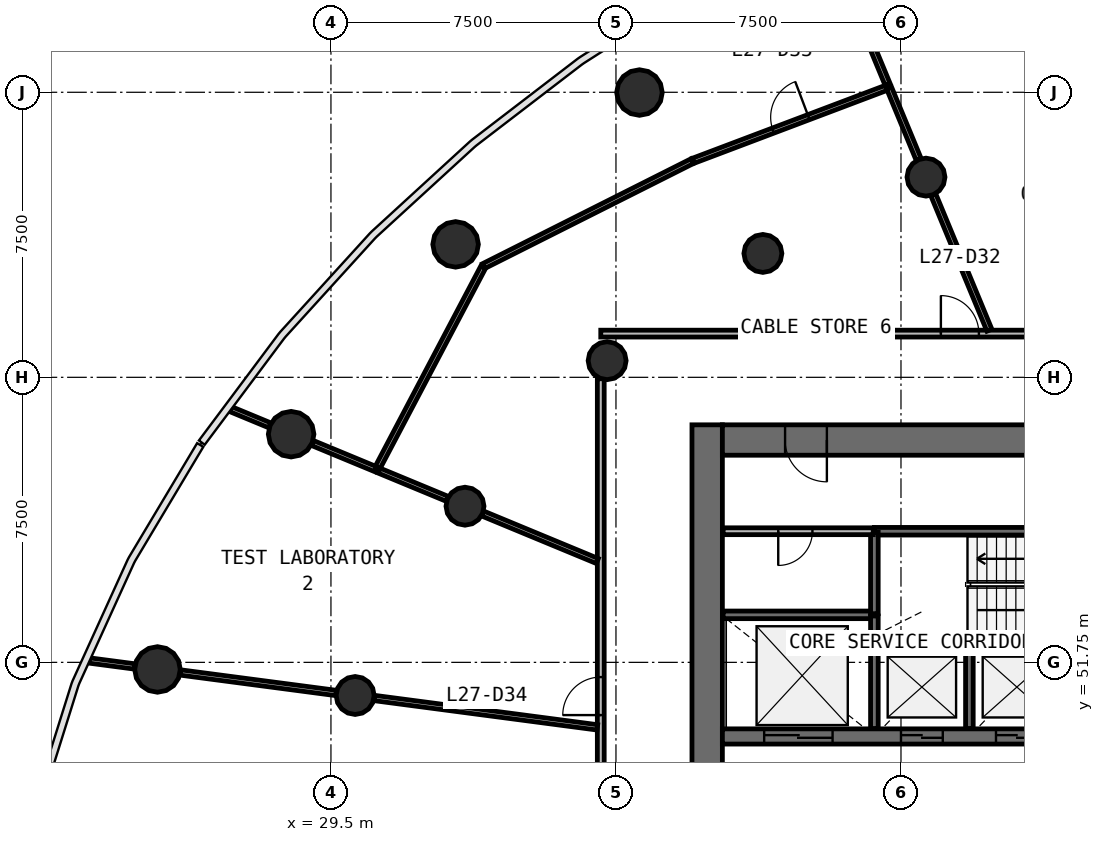
"""IFC4 building model, lengths in metres.
Left out: names, types, materials, properties, quantities, classifications, styles, units other than length and angle.
Written with IfcOpenShell. Run it as: python <this file> out.ifc"""

import sys

from ifc_helpers import new_model, si_unit, direction, frame, frame_2d, origin, origin_2d, place, context, subcontext, project, spatial, rectangle, circle, extrude, source, transform, mapped, element, fill, save


model = new_model("IFC4")
c1 = context("Model", 3, precision=1e-05, world=origin(), true_north=direction((0.0, 1.0)))
c2 = subcontext(c1, "Body", "Model", "MODEL_VIEW")
j1 = project(units=[si_unit("LENGTHUNIT", "METRE"), si_unit("PLANEANGLEUNIT", "RADIAN")], contexts=[c1])
p1 = place(None, origin())
s1 = spatial("IfcSite", under=j1, at=p1, CompositionType="ELEMENT")
p2 = place(p1, origin())
s2 = spatial("IfcBuilding", under=s1, at=p2, CompositionType="ELEMENT")
p3 = place(p2, frame((0.0, 0.0, 116.7)))
s3 = spatial("IfcBuildingStorey", under=s2, at=p3, CompositionType="ELEMENT", Elevation=116.7)
p4 = place(p3, frame((39.4, 58.0, 0.0), z_axis=(0.0, 0.0, 1.0), x_axis=(0.0, -1.0, 0.0)))
e1 = element("IfcWall", 1, at=p4, inside=s3, PredefinedType="SHEAR", context=c2, shape_type="SweptSolid", body=[
    extrude(rectangle(XDim=20.0, YDim=0.8, at=frame_2d((10.0, 0.0))), origin(), (0.0, 0.0, 1.0), 4.1),
])
p5 = place(p4, frame((9.1, 0.0, 0.0)))
e2 = element("IfcOpeningElement", 2, at=p5, cuts=e1, PredefinedType="OPENING", context=c2, shape_type="SweptSolid", body=[
    extrude(rectangle(XDim=1.8, YDim=2.1, at=frame_2d((0.9, 1.05))), frame((0.0, 0.41, 0.0), z_axis=(0.0, -1.0, 0.0), x_axis=(1.0, 0.0, 0.0)), (0.0, 0.0, 1.0), 0.82),
])
p6 = place(p3, frame((64.2, 57.6, 0.0), z_axis=(0.0, 0.0, 1.0), x_axis=(-1.0, 0.0, 0.0)))
e3 = element("IfcWall", 3, at=p6, inside=s3, PredefinedType="SHEAR", context=c2, shape_type="SweptSolid", body=[
    extrude(rectangle(XDim=24.4, YDim=0.8, at=frame_2d((12.2, 0.0))), origin(), (0.0, 0.0, 1.0), 4.1),
])
p7 = place(p6, frame((21.65, 0.0, 0.0)))
e4 = element("IfcOpeningElement", 4, at=p7, cuts=e3, PredefinedType="OPENING", context=c2, shape_type="SweptSolid", body=[
    extrude(rectangle(XDim=1.1, YDim=2.1, at=frame_2d((0.55, 1.05))), frame((0.0, 0.41, 0.0), z_axis=(0.0, -1.0, 0.0), x_axis=(1.0, 0.0, 0.0)), (0.0, 0.0, 1.0), 0.82),
])
p8 = place(p6, frame((2.15, 0.0, 0.0)))
e5 = element("IfcOpeningElement", 5, at=p8, cuts=e3, PredefinedType="OPENING", context=c2, shape_type="SweptSolid", body=[
    extrude(rectangle(XDim=1.1, YDim=2.1, at=frame_2d((0.55, 1.05))), frame((0.0, 0.41, 0.0), z_axis=(0.0, -1.0, 0.0), x_axis=(1.0, 0.0, 0.0)), (0.0, 0.0, 1.0), 0.82),
])
p9 = place(p3, frame((39.8, 49.8, 0.0), z_axis=(0.0, 0.0, 1.0), x_axis=(1.0, 0.0, 0.0)))
e6 = element("IfcWall", 6, at=p9, inside=s3, PredefinedType="SHEAR", context=c2, shape_type="SweptSolid", body=[
    extrude(rectangle(XDim=24.4, YDim=0.4, at=frame_2d((12.2, 0.0))), origin(), (0.0, 0.0, 1.0), 4.1),
])
p10 = place(p9, frame((4.7, 0.0, 0.0)))
e7 = element("IfcOpeningElement", 7, at=p10, cuts=e6, PredefinedType="OPENING", context=c2, shape_type="SweptSolid", body=[
    extrude(rectangle(XDim=1.1, YDim=2.1, at=frame_2d((0.55, 1.05))), frame((0.0, 0.21, 0.0), z_axis=(0.0, -1.0, 0.0), x_axis=(1.0, 0.0, 0.0)), (0.0, 0.0, 1.0), 0.42),
])
p11 = place(p9, frame((7.2, 0.0, 0.0)))
e8 = element("IfcOpeningElement", 8, at=p11, cuts=e6, PredefinedType="OPENING", context=c2, shape_type="SweptSolid", body=[
    extrude(rectangle(XDim=1.1, YDim=2.1, at=frame_2d((0.55, 1.05))), frame((0.0, 0.21, 0.0), z_axis=(0.0, -1.0, 0.0), x_axis=(1.0, 0.0, 0.0)), (0.0, 0.0, 1.0), 0.42),
])
p12 = place(p9, frame((9.7, 0.0, 0.0)))
e9 = element("IfcOpeningElement", 9, at=p12, cuts=e6, PredefinedType="OPENING", context=c2, shape_type="SweptSolid", body=[
    extrude(rectangle(XDim=1.1, YDim=2.1, at=frame_2d((0.55, 1.05))), frame((0.0, 0.21, 0.0), z_axis=(0.0, -1.0, 0.0), x_axis=(1.0, 0.0, 0.0)), (0.0, 0.0, 1.0), 0.42),
])
p13 = place(p9, frame((1.1, 0.0, 0.0)))
e10 = element("IfcOpeningElement", 10, at=p13, cuts=e6, PredefinedType="OPENING", context=c2, shape_type="SweptSolid", body=[
    extrude(rectangle(XDim=1.8, YDim=2.4, at=frame_2d((0.9, 1.2))), frame((0.0, 0.21, 0.0), z_axis=(0.0, -1.0, 0.0), x_axis=(1.0, 0.0, 0.0)), (0.0, 0.0, 1.0), 0.42),
])
p14 = place(p9, frame((20.65, 0.0, 0.0)))
e11 = element("IfcOpeningElement", 11, at=p14, cuts=e6, PredefinedType="OPENING", context=c2, shape_type="SweptSolid", body=[
    extrude(rectangle(XDim=0.9, YDim=2.1, at=frame_2d((0.45, 1.05))), frame((0.0, 0.21, 0.0), z_axis=(0.0, -1.0, 0.0), x_axis=(1.0, 0.0, 0.0)), (0.0, 0.0, 1.0), 0.42),
])
p15 = place(p9, frame((22.65, 0.0, 0.0)))
e12 = element("IfcOpeningElement", 12, at=p15, cuts=e6, PredefinedType="OPENING", context=c2, shape_type="SweptSolid", body=[
    extrude(rectangle(XDim=0.9, YDim=2.1, at=frame_2d((0.45, 1.05))), frame((0.0, 0.21, 0.0), z_axis=(0.0, -1.0, 0.0), x_axis=(1.0, 0.0, 0.0)), (0.0, 0.0, 1.0), 0.42),
])
p16 = place(p9, frame((11.85, 0.0, 0.0)))
e13 = element("IfcOpeningElement", 13, at=p16, cuts=e6, PredefinedType="OPENING", context=c2, shape_type="SweptSolid", body=[
    extrude(rectangle(XDim=0.9, YDim=2.1, at=frame_2d((0.45, 1.05))), frame((0.0, 0.21, 0.0), z_axis=(0.0, -1.0, 0.0), x_axis=(1.0, 0.0, 0.0)), (0.0, 0.0, 1.0), 0.42),
])
m1 = source(origin(), c2, "Body", "SweptSolid", [
    extrude(circle(Radius=0.6, at=origin_2d()), origin(), (0.0, 0.0, 1.0), 4.1),
])
for number, where, z_axis, x_axis in (
    (14, (37.618, 66.743, 0.0), (0.0, 0.0, 1.0), (1.0, 0.0, 0.0)),
    (15, (32.78, 62.748, 0.0), (0.0, 0.0, 1.0), (1.0, 0.0, 0.0)),
    (16, (28.452, 57.754, 0.0), (0.0, 0.0, 1.0), (1.0, 0.0, 0.0)),
    (17, (24.936, 51.563, 0.0), (0.0, 0.0, 1.0), (1.0, 0.0, 0.0)),
):
    element("IfcColumn", number, at=place(p3, frame(where, z_axis=z_axis, x_axis=x_axis)), inside=s3, PredefinedType="COLUMN", context=c2, shape_type="MappedRepresentation", body=[
        mapped(m1, transform((0.0, 0.0, 0.0), scale=1.0)),
    ])
m2 = source(origin(), c2, "Body", "SweptSolid", [
    extrude(circle(Radius=0.5, at=origin_2d()), origin(), (0.0, 0.0, 1.0), 4.1),
])
for number, where, z_axis, x_axis in (
    (18, (45.158, 64.518, 0.0), (0.0, 0.0, 1.0), (1.0, 0.0, 0.0)),
    (19, (40.866, 62.51, 0.0), (0.0, 0.0, 1.0), (1.0, 0.0, 0.0)),
    (20, (36.768, 59.688, 0.0), (0.0, 0.0, 1.0), (1.0, 0.0, 0.0)),
    (21, (33.028, 55.859, 0.0), (0.0, 0.0, 1.0), (1.0, 0.0, 0.0)),
    (22, (30.137, 50.878, 0.0), (0.0, 0.0, 1.0), (1.0, 0.0, 0.0)),
):
    element("IfcColumn", number, at=place(p3, frame(where, z_axis=z_axis, x_axis=x_axis)), inside=s3, PredefinedType="COLUMN", context=c2, shape_type="MappedRepresentation", body=[
        mapped(m2, transform((0.0, 0.0, 0.0), scale=1.0)),
    ])
p17 = place(p3, frame((50.4, 55.2, 0.0), z_axis=(0.0, 0.0, 1.0), x_axis=(-1.0, 0.0, 0.0)))
e23 = element("IfcWall", 23, at=p17, inside=s3, PredefinedType="SOLIDWALL", context=c2, shape_type="SweptSolid", body=[
    extrude(rectangle(XDim=6.6, YDim=0.2, at=frame_2d((3.3, 0.0))), origin(), (0.0, 0.0, 1.0), 3.7),
])
p18 = place(p17, frame((0.3, 0.0, 0.0)))
e24 = element("IfcOpeningElement", 24, at=p18, cuts=e23, PredefinedType="OPENING", context=c2, shape_type="SweptSolid", body=[
    extrude(rectangle(XDim=1.2, YDim=2.1, at=frame_2d((0.6, 1.05))), frame((0.0, 0.11, 0.0), z_axis=(0.0, -1.0, 0.0), x_axis=(1.0, 0.0, 0.0)), (0.0, 0.0, 1.0), 0.22),
])
p19 = place(p3, frame((43.8, 53.0, 0.0), z_axis=(0.0, 0.0, 1.0), x_axis=(-1.0, 0.0, 0.0)))
e25 = element("IfcWall", 25, at=p19, inside=s3, PredefinedType="SOLIDWALL", context=c2, shape_type="SweptSolid", body=[
    extrude(rectangle(XDim=3.98, YDim=0.2, at=frame_2d((1.99, 0.0))), origin(), (0.0, 0.0, 1.0), 3.7),
])
p20 = place(p3, frame((46.3, 52.4, 0.0), z_axis=(0.0, 0.0, 1.0), x_axis=(-1.0, 0.0, 0.0)))
e26 = element("IfcWall", 26, at=p20, inside=s3, PredefinedType="SOLIDWALL", context=c2, shape_type="SweptSolid", body=[
    extrude(rectangle(XDim=2.5, YDim=0.2, at=frame_2d((1.25, 0.0))), origin(), (0.0, 0.0, 1.0), 3.7),
])
p21 = place(p3, frame((48.8, 52.4, 0.0), z_axis=(0.0, 0.0, 1.0), x_axis=(-1.0, 0.0, 0.0)))
e27 = element("IfcWall", 27, at=p21, inside=s3, PredefinedType="SOLIDWALL", context=c2, shape_type="SweptSolid", body=[
    extrude(rectangle(XDim=2.47, YDim=0.2, at=frame_2d((1.235, 0.0))), origin(), (0.0, 0.0, 1.0), 3.7),
])
for number, where, z_axis, x_axis in (
    (28, (43.8, 52.37, 0.0), (0.0, 0.0, 1.0), (0.0, -1.0, 0.0)),
    (29, (46.3, 50.01, 0.0), (0.0, 0.0, 1.0), (0.0, 1.0, 0.0)),
):
    element("IfcWall", number, at=place(p3, frame(where, z_axis=z_axis, x_axis=x_axis)), inside=s3, PredefinedType="SOLIDWALL", context=c2, shape_type="SweptSolid", body=[
        extrude(rectangle(XDim=2.36, YDim=0.2, at=frame_2d((1.18, 0.0))), origin(), (0.0, 0.0, 1.0), 3.7),
    ])
p22 = place(p3, frame((43.8, 55.17, 0.0), z_axis=(0.0, 0.0, 1.0), x_axis=(0.0, -1.0, 0.0)))
e30 = element("IfcWall", 30, at=p22, inside=s3, PredefinedType="SOLIDWALL", context=c2, shape_type="SweptSolid", body=[
    extrude(rectangle(XDim=2.14, YDim=0.2, at=frame_2d((1.07, 0.0))), origin(), (0.0, 0.0, 1.0), 3.7),
])
p23 = place(p3, frame((43.8, 52.43, 0.0), z_axis=(0.0, 0.0, 1.0), x_axis=(0.0, 1.0, 0.0)))
e31 = element("IfcWall", 31, at=p23, inside=s3, PredefinedType="SOLIDWALL", context=c2, shape_type="SweptSolid", body=[
    extrude(rectangle(XDim=0.54, YDim=0.2, at=frame_2d((0.27, 0.0))), origin(), (0.0, 0.0, 1.0), 3.7),
])
p24 = place(p3, frame((36.6, 60.4, 0.0), z_axis=(0.0, 0.0, 1.0), x_axis=(1.0, 0.0, 0.0)))
e32 = element("IfcWall", 32, at=p24, inside=s3, PredefinedType="PARTITIONING", context=c2, shape_type="SweptSolid", body=[
    extrude(rectangle(XDim=30.8, YDim=0.18, at=frame_2d((15.4, 0.0))), origin(), (0.0, 0.0, 1.0), 2.9),
])
p25 = place(p24, frame((17.35, 0.0, 0.0)))
e33 = element("IfcOpeningElement", 33, at=p25, cuts=e32, PredefinedType="OPENING", context=c2, shape_type="SweptSolid", body=[
    extrude(rectangle(XDim=1.0, YDim=2.1, at=frame_2d((0.5, 1.05))), frame((0.0, 0.1, 0.0), z_axis=(0.0, -1.0, 0.0), x_axis=(1.0, 0.0, 0.0)), (0.0, 0.0, 1.0), 0.2),
])
p26 = place(p24, frame((14.95, 0.0, 0.0)))
e34 = element("IfcOpeningElement", 34, at=p26, cuts=e32, PredefinedType="OPENING", context=c2, shape_type="SweptSolid", body=[
    extrude(rectangle(XDim=1.0, YDim=2.1, at=frame_2d((0.5, 1.05))), frame((0.0, 0.1, 0.0), z_axis=(0.0, -1.0, 0.0), x_axis=(1.0, 0.0, 0.0)), (0.0, 0.0, 1.0), 0.2),
])
p27 = place(p24, frame((8.95, 0.0, 0.0)))
e35 = element("IfcOpeningElement", 35, at=p27, cuts=e32, PredefinedType="OPENING", context=c2, shape_type="SweptSolid", body=[
    extrude(rectangle(XDim=1.0, YDim=2.1, at=frame_2d((0.5, 1.05))), frame((0.0, 0.1, 0.0), z_axis=(0.0, -1.0, 0.0), x_axis=(1.0, 0.0, 0.0)), (0.0, 0.0, 1.0), 0.2),
])
p28 = place(p3, frame((36.6, 35.63, 0.0), z_axis=(0.0, 0.0, 1.0), x_axis=(0.0, 1.0, 0.0)))
e36 = element("IfcWall", 36, at=p28, inside=s3, PredefinedType="PARTITIONING", context=c2, shape_type="SweptSolid", body=[
    extrude(rectangle(XDim=23.583, YDim=0.18, at=frame_2d((11.791, 0.0))), origin(), (0.0, 0.0, 1.0), 2.9),
])
p29 = place(p28, frame((14.732, 0.0, 0.0)))
e37 = element("IfcOpeningElement", 37, at=p29, cuts=e36, PredefinedType="OPENING", context=c2, shape_type="SweptSolid", body=[
    extrude(rectangle(XDim=1.0, YDim=2.1, at=frame_2d((0.5, 1.05))), frame((0.0, 0.1, 0.0), z_axis=(0.0, -1.0, 0.0), x_axis=(1.0, 0.0, 0.0)), (0.0, 0.0, 1.0), 0.2),
])
p30 = place(p28, frame((11.333, 0.0, 0.0)))
e38 = element("IfcOpeningElement", 38, at=p30, cuts=e36, PredefinedType="OPENING", context=c2, shape_type="SweptSolid", body=[
    extrude(rectangle(XDim=1.0, YDim=2.1, at=frame_2d((0.5, 1.05))), frame((0.0, 0.1, 0.0), z_axis=(0.0, -1.0, 0.0), x_axis=(1.0, 0.0, 0.0)), (0.0, 0.0, 1.0), 0.2),
])
p31 = place(p3, frame((43.77, 55.2, 0.0), z_axis=(0.0, 0.0, 1.0), x_axis=(-1.0, 0.0, 0.0)))
e39 = element("IfcWall", 39, at=p31, inside=s3, PredefinedType="PARTITIONING", context=c2, shape_type="SweptSolid", body=[
    extrude(rectangle(XDim=3.95, YDim=0.18, at=frame_2d((1.975, 0.0))), origin(), (0.0, 0.0, 1.0), 3.7),
])
p32 = place(p31, frame((1.6, 0.0, 0.0)))
e40 = element("IfcOpeningElement", 40, at=p32, cuts=e39, PredefinedType="OPENING", context=c2, shape_type="SweptSolid", body=[
    extrude(rectangle(XDim=0.9, YDim=2.1, at=frame_2d((0.45, 1.05))), frame((0.0, 0.1, 0.0), z_axis=(0.0, -1.0, 0.0), x_axis=(1.0, 0.0, 0.0)), (0.0, 0.0, 1.0), 0.2),
])
p33 = place(p3, frame((39.004, 64.937, 0.0), z_axis=(0.0, 0.0, 1.0), x_axis=(-0.893310463622, -0.449440113456, 0.0)))
e41 = element("IfcWall", 41, at=p33, inside=s3, PredefinedType="PARTITIONING", context=c2, shape_type="SweptSolid", body=[
    extrude(rectangle(XDim=6.137, YDim=0.14, at=frame_2d((3.068, 0.0))), origin(), (0.0, 0.0, 1.0), 2.9),
])
p34 = place(p3, frame((33.508, 62.152, 0.0), z_axis=(0.0, 0.0, 1.0), x_axis=(-0.466160635686, -0.88470009706, 0.0)))
e42 = element("IfcWall", 42, at=p34, inside=s3, PredefinedType="PARTITIONING", context=c2, shape_type="SweptSolid", body=[
    extrude(rectangle(XDim=6.024, YDim=0.14, at=frame_2d((3.012, 0.0))), origin(), (0.0, 0.0, 1.0), 2.9),
])
p35 = place(p3, frame((36.51, 50.039, 0.0), z_axis=(0.0, 0.0, 1.0), x_axis=(-0.991445034615, 0.130524876315, 0.0)))
e43 = element("IfcWall", 43, at=p35, inside=s3, PredefinedType="PARTITIONING", context=c2, shape_type="SweptSolid", body=[
    extrude(rectangle(XDim=5.924, YDim=0.14, at=frame_2d((2.962, 0.0))), origin(), (0.0, 0.0, 1.0), 2.9),
])
p36 = place(p3, frame((39.032, 64.947, 0.0), z_axis=(0.0, 0.0, 1.0), x_axis=(0.935431962105, 0.353506781084, 0.0)))
e44 = element("IfcWall", 44, at=p36, inside=s3, PredefinedType="PARTITIONING", context=c2, shape_type="SweptSolid", body=[
    extrude(rectangle(XDim=5.498, YDim=0.14, at=frame_2d((2.749, 0.0))), origin(), (0.0, 0.0, 1.0), 2.9),
])
p37 = place(p36, frame((2.248, 0.0, 0.0)))
e45 = element("IfcOpeningElement", 45, at=p37, cuts=e44, PredefinedType="OPENING", context=c2, shape_type="SweptSolid", body=[
    extrude(rectangle(XDim=1.0, YDim=2.1, at=frame_2d((0.5, 1.05))), frame((0.0, 0.08, 0.0), z_axis=(0.0, -1.0, 0.0), x_axis=(1.0, 0.0, 0.0)), (0.0, 0.0, 1.0), 0.16),
])
p38 = place(p3, frame((29.637, 50.944, 0.0), z_axis=(0.0, 0.0, 1.0), x_axis=(-0.991445054296, 0.130524726824, 0.0)))
e46 = element("IfcWall", 46, at=p38, inside=s3, PredefinedType="PARTITIONING", context=c2, shape_type="SweptSolid", body=[
    extrude(rectangle(XDim=4.137, YDim=0.14, at=frame_2d((2.069, 0.0))), origin(), (0.0, 0.0, 1.0), 2.9),
])
p39 = place(p3, frame((46.826, 60.49, 0.0), z_axis=(0.0, 0.0, 1.0), x_axis=(-0.382644558062, 0.923895633817, 0.0)))
e47 = element("IfcWall", 47, at=p39, inside=s3, PredefinedType="PARTITIONING", context=c2, shape_type="SweptSolid", body=[
    extrude(rectangle(XDim=3.854, YDim=0.14, at=frame_2d((1.927, 0.0))), origin(), (0.0, 0.0, 1.0), 2.9),
])
p40 = place(p3, frame((36.51, 54.416, 0.0), z_axis=(0.0, 0.0, 1.0), x_axis=(-0.923911109142, 0.382607190737, 0.0)))
e48 = element("IfcWall", 48, at=p40, inside=s3, PredefinedType="PARTITIONING", context=c2, shape_type="SweptSolid", body=[
    extrude(rectangle(XDim=3.264, YDim=0.14, at=frame_2d((1.632, 0.0))), origin(), (0.0, 0.0, 1.0), 2.9),
])
p41 = place(p3, frame((44.965, 64.984, 0.0), z_axis=(0.0, 0.0, 1.0), x_axis=(-0.382705198342, 0.923870516448, 0.0)))
e49 = element("IfcWall", 49, at=p41, inside=s3, PredefinedType="PARTITIONING", context=c2, shape_type="SweptSolid", body=[
    extrude(rectangle(XDim=2.034, YDim=0.14, at=frame_2d((1.017, 0.0))), origin(), (0.0, 0.0, 1.0), 2.9),
])
p42 = place(p3, frame((32.561, 56.052, 0.0), z_axis=(0.0, 0.0, 1.0), x_axis=(-0.923859136089, 0.382732669974, 0.0)))
e50 = element("IfcWall", 50, at=p42, inside=s3, PredefinedType="PARTITIONING", context=c2, shape_type="SweptSolid", body=[
    extrude(rectangle(XDim=1.944, YDim=0.14, at=frame_2d((0.972, 0.0))), origin(), (0.0, 0.0, 1.0), 2.9),
])
p43 = place(p3, frame((30.673, 56.834, 0.0), z_axis=(0.0, 0.0, 1.0), x_axis=(-0.923914248106, 0.382599610751, 0.0)))
e51 = element("IfcWall", 51, at=p43, inside=s3, PredefinedType="PARTITIONING", context=c2, shape_type="SweptSolid", body=[
    extrude(rectangle(XDim=1.798, YDim=0.14, at=frame_2d((0.899, 0.0))), origin(), (0.0, 0.0, 1.0), 2.9),
])
p44 = place(p3, frame((24.336, 51.642, 0.0), z_axis=(0.0, 0.0, 1.0), x_axis=(-0.991444694364, 0.130527460778, 0.0)))
e52 = element("IfcWall", 52, at=p44, inside=s3, PredefinedType="PARTITIONING", context=c2, shape_type="SweptSolid", body=[
    extrude(rectangle(XDim=1.212, YDim=0.14, at=frame_2d((0.606, 0.0))), origin(), (0.0, 0.0, 1.0), 2.9),
])
p45 = place(p3, frame((44.148, 66.955, 0.0), z_axis=(0.0, 0.0, 1.0), x_axis=(-0.382734457734, 0.923858395461, 0.0)))
e53 = element("IfcWall", 53, at=p45, inside=s3, PredefinedType="PARTITIONING", context=c2, shape_type="SweptSolid", body=[
    extrude(rectangle(XDim=1.014, YDim=0.14, at=frame_2d((0.507, 0.0))), origin(), (0.0, 0.0, 1.0), 2.9),
])
p46 = place(p3, frame((27.893, 57.985, 0.0), z_axis=(0.0, 0.0, 1.0), x_axis=(-0.923895360736, 0.382645217415, 0.0)))
e54 = element("IfcWall", 54, at=p46, inside=s3, PredefinedType="PARTITIONING", context=c2, shape_type="SweptSolid", body=[
    extrude(rectangle(XDim=1.127, YDim=0.14, at=frame_2d((0.563, 0.0))), origin(), (0.0, 0.0, 1.0), 2.9),
])
m3 = source(origin(), c2, "Body", "SweptSolid", [
    extrude(rectangle(XDim=1.1, YDim=2.1, at=frame_2d((0.55, 1.05))), frame((0.0, 0.025, 0.0), z_axis=(0.0, -1.0, 0.0), x_axis=(1.0, 0.0, 0.0)), (0.0, 0.0, 1.0), 0.05),
])
p47 = place(p10, origin())
e55 = element("IfcDoor", 55, at=p47, inside=s3, OperationType="DOUBLE_DOOR_SLIDING", PredefinedType="USERDEFINED", context=c2, shape_type="MappedRepresentation", body=[
    mapped(m3, transform((0.0, 0.0, 0.0), scale=1.0)),
])
fill(e7, e55)
p48 = place(p11, origin())
e56 = element("IfcDoor", 56, at=p48, inside=s3, OperationType="DOUBLE_DOOR_SLIDING", PredefinedType="USERDEFINED", context=c2, shape_type="MappedRepresentation", body=[
    mapped(m3, transform((0.0, 0.0, 0.0), scale=1.0)),
])
fill(e8, e56)
m4 = source(origin(), c2, "Body", "SweptSolid", [
    extrude(rectangle(XDim=1.8, YDim=2.4, at=frame_2d((0.9, 1.2))), frame((0.0, 0.025, 0.0), z_axis=(0.0, -1.0, 0.0), x_axis=(1.0, 0.0, 0.0)), (0.0, 0.0, 1.0), 0.05),
])
p49 = place(p13, origin())
e57 = element("IfcDoor", 57, at=p49, inside=s3, OperationType="DOUBLE_DOOR_SLIDING", PredefinedType="USERDEFINED", context=c2, shape_type="MappedRepresentation", body=[
    mapped(m4, transform((0.0, 0.0, 0.0), scale=1.0)),
])
fill(e10, e57)
m5 = source(origin(), c2, "Body", "SweptSolid", [
    extrude(rectangle(XDim=1.1, YDim=2.1, at=frame_2d((0.55, 1.05))), frame((0.0, 0.025, 0.0), z_axis=(0.0, -1.0, 0.0), x_axis=(1.0, 0.0, 0.0)), (0.0, 0.0, 1.0), 0.05),
])
p50 = place(p7, origin())
e58 = element("IfcDoor", 58, at=p50, inside=s3, OperationType="SINGLE_SWING_LEFT", PredefinedType="DOOR", context=c2, shape_type="MappedRepresentation", body=[
    mapped(m5, transform((0.0, 0.0, 0.0), scale=1.0)),
])
fill(e4, e58)
m6 = source(origin(), c2, "Body", "SweptSolid", [
    extrude(rectangle(XDim=1.0, YDim=2.1, at=frame_2d((0.5, 1.05))), frame((0.0, 0.025, 0.0), z_axis=(0.0, -1.0, 0.0), x_axis=(1.0, 0.0, 0.0)), (0.0, 0.0, 1.0), 0.05),
])
p51 = place(p27, origin())
e59 = element("IfcDoor", 59, at=p51, inside=s3, OperationType="SINGLE_SWING_LEFT", PredefinedType="DOOR", context=c2, shape_type="MappedRepresentation", body=[
    mapped(m6, transform((0.0, 0.0, 0.0), scale=1.0)),
])
fill(e35, e59)
p52 = place(p37, origin())
e60 = element("IfcDoor", 60, at=p52, inside=s3, OperationType="SINGLE_SWING_RIGHT", PredefinedType="DOOR", context=c2, shape_type="MappedRepresentation", body=[
    mapped(m6, transform((0.0, 0.0, 0.0), scale=1.0)),
])
fill(e45, e60)
p53 = place(p29, origin())
e61 = element("IfcDoor", 61, at=p53, inside=s3, OperationType="SINGLE_SWING_LEFT", PredefinedType="DOOR", context=c2, shape_type="MappedRepresentation", body=[
    mapped(m6, transform((0.0, 0.0, 0.0), scale=1.0)),
])
fill(e37, e61)
m7 = source(origin(), c2, "Body", "SweptSolid", [
    extrude(rectangle(XDim=0.9, YDim=2.1, at=frame_2d((0.45, 1.05))), frame((0.0, 0.025, 0.0), z_axis=(0.0, -1.0, 0.0), x_axis=(1.0, 0.0, 0.0)), (0.0, 0.0, 1.0), 0.05),
])
p54 = place(p32, origin())
e62 = element("IfcDoor", 62, at=p54, inside=s3, OperationType="SINGLE_SWING_RIGHT", PredefinedType="DOOR", context=c2, shape_type="MappedRepresentation", body=[
    mapped(m7, transform((0.0, 0.0, 0.0), scale=1.0)),
])
fill(e40, e62)
save(model, sys.argv[1])
